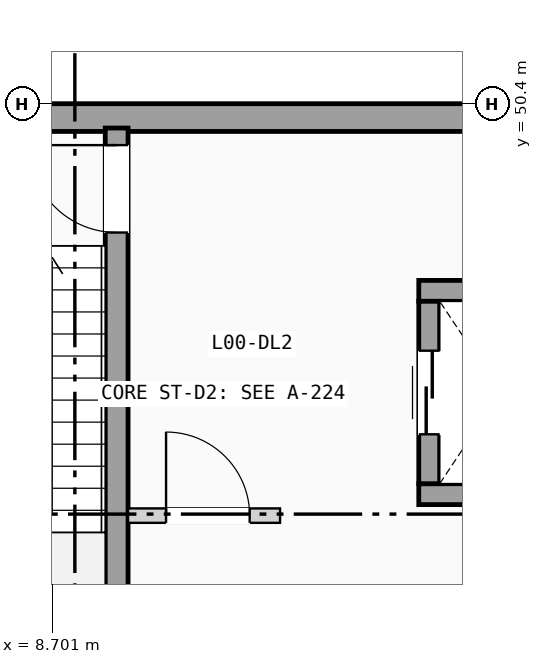
"""IFC4 building model, lengths in metres.
Left out: names, types, materials, properties, quantities, classifications, styles, units other than length and angle.
Written with IfcOpenShell. Run it as: python <this file> out.ifc"""

import sys

from ifc_helpers import new_model, si_unit, direction, frame, frame_2d, origin, place, context, subcontext, project, spatial, rectangle, extrude, element, fill, save


model = new_model("IFC4")
c1 = context("Model", 3, precision=1e-05, world=origin(), true_north=direction((0.0, 1.0)))
c2 = subcontext(c1, "Body", "Model", "MODEL_VIEW")
j1 = project(units=[si_unit("LENGTHUNIT", "METRE"), si_unit("PLANEANGLEUNIT", "RADIAN")], contexts=[c1])
p1 = place(None, origin())
s1 = spatial("IfcSite", under=j1, at=p1, CompositionType="ELEMENT")
p2 = place(p1, origin())
s2 = spatial("IfcBuilding", under=s1, at=p2, CompositionType="ELEMENT")
p3 = place(p2, origin())
s3 = spatial("IfcBuildingStorey", under=s2, at=p3, CompositionType="ELEMENT", Elevation=0.0)
p4 = place(p3, frame((0.0, 50.218, 0.0), z_axis=(0.0, 0.0, 1.0), x_axis=(1.0, 0.0, 0.0)))
e1 = element("IfcWall", 1, at=p4, inside=s3, PredefinedType="SOLIDWALL", context=c2, shape_type="SweptSolid", body=[
    extrude(rectangle(XDim=21.6, YDim=0.365, at=frame_2d((10.8, 0.0))), origin(), (0.0, 0.0, 1.0), 4.64),
])
p5 = place(p4, frame((7.25, 0.0, 0.0)))
e2 = element("IfcOpeningElement", 2, at=p5, cuts=e1, PredefinedType="OPENING", context=c2, shape_type="SweptSolid", body=[
    extrude(rectangle(XDim=1.3, YDim=2.2, at=frame_2d((0.65, 1.1))), frame((0.0, 0.192, 0.0), z_axis=(0.0, -1.0, 0.0), x_axis=(1.0, 0.0, 0.0)), (0.0, 0.0, 1.0), 0.385),
])
p6 = place(p3, frame((9.55, 43.08, 0.0), z_axis=(0.0, 0.0, 1.0), x_axis=(0.0, 1.0, 0.0)))
e3 = element("IfcWall", 3, at=p6, inside=s3, PredefinedType="SHEAR", context=c2, shape_type="SweptSolid", body=[
    extrude(rectangle(XDim=7.0, YDim=0.3, at=frame_2d((3.5, 0.0))), origin(), (0.0, 0.0, 1.0), 4.64),
])
p7 = place(p6, frame((5.625, 0.0, 0.0)))
e4 = element("IfcOpeningElement", 4, at=p7, cuts=e3, PredefinedType="OPENING", context=c2, shape_type="SweptSolid", body=[
    extrude(rectangle(XDim=1.15, YDim=2.12, at=frame_2d((0.575, 1.06))), frame((0.0, 0.16, 0.0), z_axis=(0.0, -1.0, 0.0), x_axis=(1.0, 0.0, 0.0)), (0.0, 0.0, 1.0), 0.32),
])
for number, where, z_axis, x_axis in (
    (5, (13.525, 45.262, 0.0), (0.0, 0.0, 1.0), (1.0, 0.0, 0.0)),
    (6, (13.525, 47.938, 0.0), (0.0, 0.0, 1.0), (1.0, 0.0, 0.0)),
):
    element("IfcWall", number, at=place(p3, frame(where, z_axis=z_axis, x_axis=x_axis)), inside=s3, PredefinedType="SHEAR", context=c2, shape_type="SweptSolid", body=[
        extrude(rectangle(XDim=2.15, YDim=0.275, at=frame_2d((1.075, 0.0))), origin(), (0.0, 0.0, 1.0), 4.64),
    ])
p8 = place(p3, frame((13.663, 45.4, 0.0), z_axis=(0.0, 0.0, 1.0), x_axis=(0.0, 1.0, 0.0)))
e7 = element("IfcWall", 7, at=p8, inside=s3, PredefinedType="SHEAR", context=c2, shape_type="SweptSolid", body=[
    extrude(rectangle(XDim=2.4, YDim=0.275, at=frame_2d((1.2, 0.0))), origin(), (0.0, 0.0, 1.0), 4.64),
])
p9 = place(p8, frame((0.65, 0.0, 0.0)))
e8 = element("IfcOpeningElement", 8, at=p9, cuts=e7, PredefinedType="OPENING", context=c2, shape_type="SweptSolid", body=[
    extrude(rectangle(XDim=1.1, YDim=2.15, at=frame_2d((0.55, 1.075))), frame((0.0, 0.147, 0.0), z_axis=(0.0, -1.0, 0.0), x_axis=(1.0, 0.0, 0.0)), (0.0, 0.0, 1.0), 0.295),
])
p10 = place(p3, frame((9.7, 44.98, 0.0), z_axis=(0.0, 0.0, 1.0), x_axis=(1.0, 0.0, 0.0)))
e9 = element("IfcWall", 9, at=p10, inside=s3, PredefinedType="PARTITIONING", context=c2, shape_type="SweptSolid", body=[
    extrude(rectangle(XDim=2.0, YDim=0.19, at=frame_2d((1.0, 0.0))), origin(), (0.0, 0.0, 1.0), 3.84),
])
p11 = place(p10, frame((0.5, 0.0, 0.0)))
e10 = element("IfcOpeningElement", 10, at=p11, cuts=e9, PredefinedType="OPENING", context=c2, shape_type="SweptSolid", body=[
    extrude(rectangle(XDim=1.1, YDim=2.12, at=frame_2d((0.55, 1.06))), frame((0.0, 0.105, 0.0), z_axis=(0.0, -1.0, 0.0), x_axis=(1.0, 0.0, 0.0)), (0.0, 0.0, 1.0), 0.21),
])
p12 = place(p7, origin())
e11 = element("IfcDoor", 11, at=p12, inside=s3, OperationType="SINGLE_SWING_RIGHT", PredefinedType="DOOR", context=c2, shape_type="SweptSolid", body=[
    extrude(rectangle(XDim=1.15, YDim=2.12, at=frame_2d((0.575, 1.06))), frame((0.0, 0.025, 0.0), z_axis=(0.0, -1.0, 0.0), x_axis=(1.0, 0.0, 0.0)), (0.0, 0.0, 1.0), 0.05),
])
fill(e4, e11)
p13 = place(p9, origin())
e12 = element("IfcDoor", 12, at=p13, inside=s3, OperationType="SLIDING_TO_LEFT", PredefinedType="DOOR", context=c2, shape_type="SweptSolid", body=[
    extrude(rectangle(XDim=1.1, YDim=2.15, at=frame_2d((0.55, 1.075))), frame((0.0, 0.025, 0.0), z_axis=(0.0, -1.0, 0.0), x_axis=(1.0, 0.0, 0.0)), (0.0, 0.0, 1.0), 0.05),
])
fill(e8, e12)
p14 = place(p11, origin())
e13 = element("IfcDoor", 13, at=p14, inside=s3, OperationType="SINGLE_SWING_LEFT", PredefinedType="DOOR", context=c2, shape_type="SweptSolid", body=[
    extrude(rectangle(XDim=1.1, YDim=2.12, at=frame_2d((0.55, 1.06))), frame((0.0, 0.025, 0.0), z_axis=(0.0, -1.0, 0.0), x_axis=(1.0, 0.0, 0.0)), (0.0, 0.0, 1.0), 0.05),
])
fill(e10, e13)
save(model, sys.argv[1])
